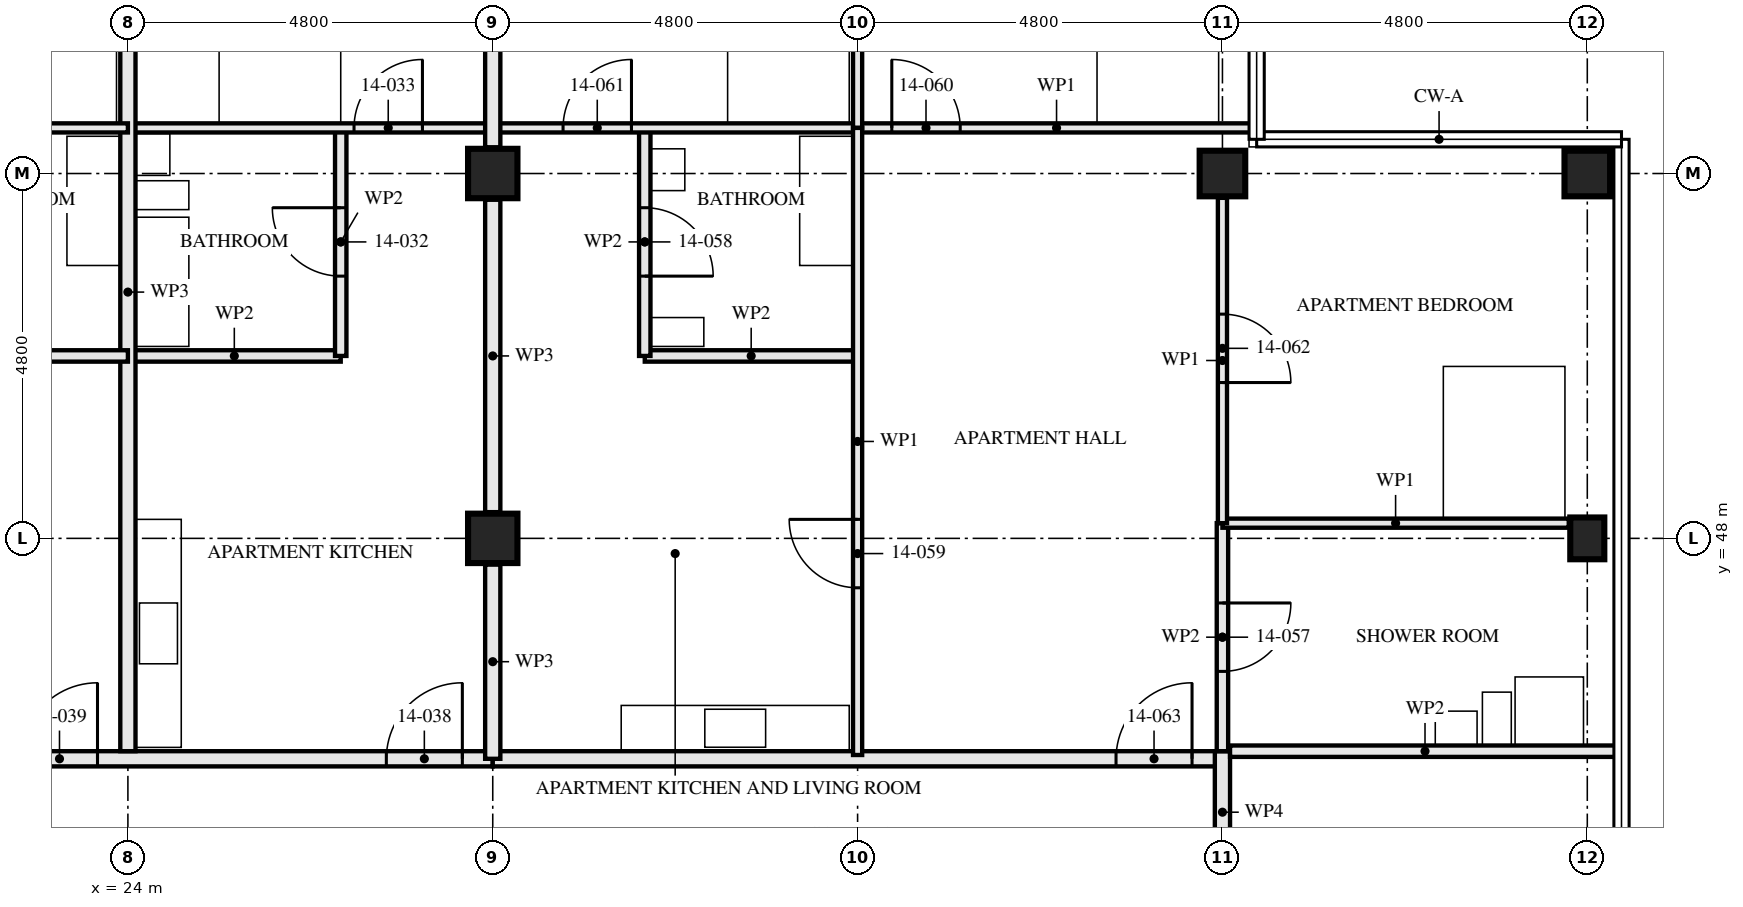
"""IFC4 building model, lengths in metres.
Left out: names, types, materials, properties, quantities, classifications, styles, units other than length and angle.
Written with IfcOpenShell. Run it as: python <this file> out.ifc"""

import sys

from ifc_helpers import new_model, si_unit, direction, frame, frame_2d, origin, origin_2d, place, context, subcontext, project, spatial, rectangle, hollow_rectangle, i_section, extrude, element, fill, save


model = new_model("IFC4")
c1 = context("Model", 3, precision=1e-05, world=origin(), true_north=direction((0.0, 1.0)))
c2 = subcontext(c1, "Body", "Model", "MODEL_VIEW")
j1 = project(units=[si_unit("LENGTHUNIT", "METRE"), si_unit("PLANEANGLEUNIT", "RADIAN")], contexts=[c1])
p1 = place(None, origin())
s1 = spatial("IfcSite", under=j1, at=p1, CompositionType="ELEMENT")
p2 = place(p1, origin())
s2 = spatial("IfcBuilding", under=s1, at=p2, CompositionType="ELEMENT")
p3 = place(p2, frame((0.0, 0.0, 55.0)))
s3 = spatial("IfcBuildingStorey", under=s2, at=p3, CompositionType="ELEMENT", Elevation=55.0)
for number, where, z_axis, x_axis in (
    (1, (28.8, 48.0, 0.0), (0.0, 0.0, 1.0), (1.0, 0.0, 0.0)),
    (2, (28.8, 52.8, 0.0), (0.0, 0.0, 1.0), (1.0, 0.0, 0.0)),
):
    element("IfcColumn", number, at=place(p3, frame(where, z_axis=z_axis, x_axis=x_axis)), inside=s3, PredefinedType="COLUMN", context=c2, shape_type="SweptSolid", body=[
        extrude(hollow_rectangle(XDim=0.65, YDim=0.65, WallThickness=0.05, at=origin_2d()), origin(), (0.0, 0.0, 1.0), 3.5),
    ])
p4 = place(p3, frame((38.4, 52.8, 0.0), z_axis=(0.0, 0.0, 1.0), x_axis=(0.0, 1.0, 0.0)))
e3 = element("IfcColumn", 3, at=p4, inside=s3, PredefinedType="COLUMN", context=c2, shape_type="SweptSolid", body=[
    extrude(hollow_rectangle(XDim=0.6, YDim=0.6, WallThickness=0.05, at=origin_2d()), origin(), (0.0, 0.0, 1.0), 3.5),
])
p5 = place(p3, frame((43.2, 48.0, 0.0), z_axis=(0.0, 0.0, 1.0), x_axis=(1.0, 0.0, 0.0)))
e4 = element("IfcColumn", 4, at=p5, inside=s3, PredefinedType="COLUMN", context=c2, shape_type="SweptSolid", body=[
    extrude(i_section(OverallWidth=0.448, OverallDepth=0.55, WebThickness=0.072, FlangeThickness=0.115, FilletRadius=0.015, at=origin_2d()), origin(), (0.0, 0.0, 1.0), 3.5),
])
p6 = place(p3, frame((43.2, 52.8, 0.0), z_axis=(0.0, 0.0, 1.0), x_axis=(0.0, 1.0, 0.0)))
e5 = element("IfcColumn", 5, at=p6, inside=s3, PredefinedType="COLUMN", context=c2, shape_type="SweptSolid", body=[
    extrude(hollow_rectangle(XDim=0.6, YDim=0.6, WallThickness=0.05, at=origin_2d()), origin(), (0.0, 0.0, 1.0), 3.5),
])
p7 = place(p3, frame((26.8, 53.4, 0.0), z_axis=(0.0, 0.0, 1.0), x_axis=(0.0, -1.0, 0.0)))
e6 = element("IfcWall", 6, at=p7, inside=s3, PredefinedType="PARTITIONING", context=c2, shape_type="SweptSolid", body=[
    extrude(rectangle(XDim=3.0, YDim=0.15, at=frame_2d((1.5, 0.0))), origin(), (0.0, 0.0, 1.0), 2.55),
])
p8 = place(p7, frame((1.05, 0.0, 0.0)))
e7 = element("IfcOpeningElement", 7, at=p8, cuts=e6, PredefinedType="OPENING", context=c2, shape_type="SweptSolid", body=[
    extrude(rectangle(XDim=0.9, YDim=2.1, at=frame_2d((0.45, 1.05))), frame((0.0, 0.085, 0.0), z_axis=(0.0, -1.0, 0.0), x_axis=(1.0, 0.0, 0.0)), (0.0, 0.0, 1.0), 0.171),
])
p9 = place(p3, frame((26.8, 50.4, 0.0), z_axis=(0.0, 0.0, 1.0), x_axis=(-1.0, 0.0, 0.0)))
e8 = element("IfcWall", 8, at=p9, inside=s3, PredefinedType="PARTITIONING", context=c2, shape_type="SweptSolid", body=[
    extrude(rectangle(XDim=2.8, YDim=0.15, at=frame_2d((1.4, 0.0))), origin(), (0.0, 0.0, 1.0), 3.33),
])
p10 = place(p3, frame((28.8, 53.4, 0.0), z_axis=(0.0, 0.0, 1.0), x_axis=(-1.0, 0.0, 0.0)))
e9 = element("IfcWall", 9, at=p10, inside=s3, PredefinedType="PARTITIONING", context=c2, shape_type="SweptSolid", body=[
    extrude(rectangle(XDim=4.8, YDim=0.12, at=frame_2d((2.4, 0.0))), origin(), (0.0, 0.0, 1.0), 3.33),
])
p11 = place(p10, frame((0.925, 0.0, 0.0)))
e10 = element("IfcOpeningElement", 10, at=p11, cuts=e9, PredefinedType="OPENING", context=c2, shape_type="SweptSolid", body=[
    extrude(rectangle(XDim=0.9, YDim=2.1, at=frame_2d((0.45, 1.05))), frame((0.0, 0.071, 0.0), z_axis=(0.0, -1.0, 0.0), x_axis=(1.0, 0.0, 0.0)), (0.0, 0.0, 1.0), 0.141),
])
p12 = place(p3, frame((24.0, 57.28, 0.0), z_axis=(0.0, 0.0, 1.0), x_axis=(0.0, -1.0, 0.0)))
e11 = element("IfcWall", 11, at=p12, inside=s3, PredefinedType="PARTITIONING", context=c2, shape_type="SweptSolid", body=[
    extrude(rectangle(XDim=12.08, YDim=0.2, at=frame_2d((6.04, 0.0))), origin(), (0.0, 0.0, 1.0), 2.55),
])
p13 = place(p3, frame((24.0, 50.4, 0.0), z_axis=(0.0, 0.0, 1.0), x_axis=(-1.0, 0.0, 0.0)))
e12 = element("IfcWall", 12, at=p13, inside=s3, PredefinedType="PARTITIONING", context=c2, shape_type="SweptSolid", body=[
    extrude(rectangle(XDim=2.8, YDim=0.15, at=frame_2d((1.4, 0.0))), origin(), (0.0, 0.0, 1.0), 3.33),
])
p14 = place(p3, frame((24.0, 53.4, 0.0), z_axis=(0.0, 0.0, 1.0), x_axis=(-1.0, 0.0, 0.0)))
e13 = element("IfcWall", 13, at=p14, inside=s3, PredefinedType="PARTITIONING", context=c2, shape_type="SweptSolid", body=[
    extrude(rectangle(XDim=4.8, YDim=0.12, at=frame_2d((2.4, 0.0))), origin(), (0.0, 0.0, 1.0), 3.33),
])
p15 = place(p14, frame((3.45, 0.0, 0.0)))
e14 = element("IfcOpeningElement", 14, at=p15, cuts=e13, PredefinedType="OPENING", context=c2, shape_type="SweptSolid", body=[
    extrude(rectangle(XDim=0.9, YDim=2.1, at=frame_2d((0.45, 1.05))), frame((0.0, 0.071, 0.0), z_axis=(0.0, -1.0, 0.0), x_axis=(1.0, 0.0, 0.0)), (0.0, 0.0, 1.0), 0.141),
])
p16 = place(p3, frame((28.8, 45.1, 0.0), z_axis=(0.0, 0.0, 1.0), x_axis=(-1.0, 0.0, 0.0)))
e15 = element("IfcWall", 15, at=p16, inside=s3, PredefinedType="PARTITIONING", context=c2, shape_type="SweptSolid", body=[
    extrude(rectangle(XDim=14.4, YDim=0.2, at=frame_2d((7.2, 0.0))), origin(), (0.0, 0.0, 1.0), 3.33),
])
p17 = place(p16, frame((0.4, 0.0, 0.0)))
e16 = element("IfcOpeningElement", 16, at=p17, cuts=e15, PredefinedType="OPENING", context=c2, shape_type="SweptSolid", body=[
    extrude(rectangle(XDim=1.0, YDim=2.1, at=frame_2d((0.5, 1.05))), frame((0.0, 0.111, 0.0), z_axis=(0.0, -1.0, 0.0), x_axis=(1.0, 0.0, 0.0)), (0.0, 0.0, 1.0), 0.221),
])
p18 = place(p16, frame((5.2, 0.0, 0.0)))
e17 = element("IfcOpeningElement", 17, at=p18, cuts=e15, PredefinedType="OPENING", context=c2, shape_type="SweptSolid", body=[
    extrude(rectangle(XDim=1.0, YDim=2.1, at=frame_2d((0.5, 1.05))), frame((0.0, 0.111, 0.0), z_axis=(0.0, -1.0, 0.0), x_axis=(1.0, 0.0, 0.0)), (0.0, 0.0, 1.0), 0.221),
])
p19 = place(p16, frame((10.0, 0.0, 0.0)))
e18 = element("IfcOpeningElement", 18, at=p19, cuts=e15, PredefinedType="OPENING", context=c2, shape_type="SweptSolid", body=[
    extrude(rectangle(XDim=1.0, YDim=2.1, at=frame_2d((0.5, 1.05))), frame((0.0, 0.111, 0.0), z_axis=(0.0, -1.0, 0.0), x_axis=(1.0, 0.0, 0.0)), (0.0, 0.0, 1.0), 0.221),
])
p20 = place(p3, frame((38.4, 48.2, 0.0), z_axis=(0.0, 0.0, 1.0), x_axis=(0.0, -1.0, 0.0)))
e19 = element("IfcWall", 19, at=p20, inside=s3, PredefinedType="PARTITIONING", context=c2, shape_type="SweptSolid", body=[
    extrude(rectangle(XDim=3.0, YDim=0.15, at=frame_2d((1.5, 0.0))), origin(), (0.0, 0.0, 1.0), 2.55),
])
p21 = place(p20, frame((1.05, 0.0, 0.0)))
e20 = element("IfcOpeningElement", 20, at=p21, cuts=e19, PredefinedType="OPENING", context=c2, shape_type="SweptSolid", body=[
    extrude(rectangle(XDim=0.9, YDim=2.1, at=frame_2d((0.45, 1.05))), frame((0.0, 0.085, 0.0), z_axis=(0.0, -1.0, 0.0), x_axis=(1.0, 0.0, 0.0)), (0.0, 0.0, 1.0), 0.171),
])
p22 = place(p3, frame((30.8, 53.4, 0.0), z_axis=(0.0, 0.0, 1.0), x_axis=(0.0, -1.0, 0.0)))
e21 = element("IfcWall", 21, at=p22, inside=s3, PredefinedType="PARTITIONING", context=c2, shape_type="SweptSolid", body=[
    extrude(rectangle(XDim=3.0, YDim=0.15, at=frame_2d((1.5, 0.0))), origin(), (0.0, 0.0, 1.0), 2.55),
])
p23 = place(p22, frame((1.05, 0.0, 0.0)))
e22 = element("IfcOpeningElement", 22, at=p23, cuts=e21, PredefinedType="OPENING", context=c2, shape_type="SweptSolid", body=[
    extrude(rectangle(XDim=0.9, YDim=2.1, at=frame_2d((0.45, 1.05))), frame((0.0, 0.085, 0.0), z_axis=(0.0, -1.0, 0.0), x_axis=(1.0, 0.0, 0.0)), (0.0, 0.0, 1.0), 0.171),
])
p24 = place(p3, frame((33.6, 50.4, 0.0), z_axis=(0.0, 0.0, 1.0), x_axis=(-1.0, 0.0, 0.0)))
e23 = element("IfcWall", 23, at=p24, inside=s3, PredefinedType="PARTITIONING", context=c2, shape_type="SweptSolid", body=[
    extrude(rectangle(XDim=2.8, YDim=0.15, at=frame_2d((1.4, 0.0))), origin(), (0.0, 0.0, 1.0), 3.33),
])
p25 = place(p3, frame((33.6, 53.4, 0.0), z_axis=(0.0, 0.0, 1.0), x_axis=(0.0, -1.0, 0.0)))
e24 = element("IfcWall", 24, at=p25, inside=s3, PredefinedType="PARTITIONING", context=c2, shape_type="SweptSolid", body=[
    extrude(rectangle(XDim=8.25, YDim=0.12, at=frame_2d((4.125, 0.0))), origin(), (0.0, 0.0, 1.0), 2.55),
])
p26 = place(p25, frame((5.15, 0.0, 0.0)))
e25 = element("IfcOpeningElement", 25, at=p26, cuts=e24, PredefinedType="OPENING", context=c2, shape_type="SweptSolid", body=[
    extrude(rectangle(XDim=0.9, YDim=2.1, at=frame_2d((0.45, 1.05))), frame((0.0, 0.071, 0.0), z_axis=(0.0, -1.0, 0.0), x_axis=(1.0, 0.0, 0.0)), (0.0, 0.0, 1.0), 0.141),
])
p27 = place(p3, frame((42.956, 48.2, 0.0), z_axis=(0.0, 0.0, 1.0), x_axis=(-1.0, 0.0, 0.0)))
e26 = element("IfcWall", 26, at=p27, inside=s3, PredefinedType="PARTITIONING", context=c2, shape_type="SweptSolid", body=[
    extrude(rectangle(XDim=4.556, YDim=0.12, at=frame_2d((2.278, 0.0))), origin(), (0.0, 0.0, 1.0), 3.33),
])
p28 = place(p3, frame((38.835, 53.4, 0.0), z_axis=(0.0, 0.0, 1.0), x_axis=(-1.0, 0.0, 0.0)))
e27 = element("IfcWall", 27, at=p28, inside=s3, PredefinedType="PARTITIONING", context=c2, shape_type="SweptSolid", body=[
    extrude(rectangle(XDim=5.235, YDim=0.12, at=frame_2d((2.617, 0.0))), origin(), (0.0, 0.0, 1.0), 2.32),
])
p29 = place(p28, frame((3.885, 0.0, 0.0)))
e28 = element("IfcOpeningElement", 28, at=p29, cuts=e27, PredefinedType="OPENING", context=c2, shape_type="SweptSolid", body=[
    extrude(rectangle(XDim=0.9, YDim=2.1, at=frame_2d((0.45, 1.05))), frame((0.0, 0.071, 0.0), z_axis=(0.0, -1.0, 0.0), x_axis=(1.0, 0.0, 0.0)), (0.0, 0.0, 1.0), 0.141),
])
p30 = place(p3, frame((33.6, 53.4, 0.0), z_axis=(0.0, 0.0, 1.0), x_axis=(-1.0, 0.0, 0.0)))
e29 = element("IfcWall", 29, at=p30, inside=s3, PredefinedType="PARTITIONING", context=c2, shape_type="SweptSolid", body=[
    extrude(rectangle(XDim=4.8, YDim=0.12, at=frame_2d((2.4, 0.0))), origin(), (0.0, 0.0, 1.0), 3.33),
])
p31 = place(p30, frame((2.975, 0.0, 0.0)))
e30 = element("IfcOpeningElement", 30, at=p31, cuts=e29, PredefinedType="OPENING", context=c2, shape_type="SweptSolid", body=[
    extrude(rectangle(XDim=0.9, YDim=2.1, at=frame_2d((0.45, 1.05))), frame((0.0, 0.071, 0.0), z_axis=(0.0, -1.0, 0.0), x_axis=(1.0, 0.0, 0.0)), (0.0, 0.0, 1.0), 0.141),
])
p32 = place(p3, frame((38.4, 52.48, 0.0), z_axis=(0.0, 0.0, 1.0), x_axis=(0.0, -1.0, 0.0)))
e31 = element("IfcWall", 31, at=p32, inside=s3, PredefinedType="PARTITIONING", context=c2, shape_type="SweptSolid", body=[
    extrude(rectangle(XDim=4.28, YDim=0.12, at=frame_2d((2.14, 0.0))), origin(), (0.0, 0.0, 1.0), 3.33),
])
p33 = place(p32, frame((1.53, 0.0, 0.0)))
e32 = element("IfcOpeningElement", 32, at=p33, cuts=e31, PredefinedType="OPENING", context=c2, shape_type="SweptSolid", body=[
    extrude(rectangle(XDim=0.9, YDim=2.1, at=frame_2d((0.45, 1.05))), frame((0.0, 0.071, 0.0), z_axis=(0.0, -1.0, 0.0), x_axis=(1.0, 0.0, 0.0)), (0.0, 0.0, 1.0), 0.141),
])
p34 = place(p3, frame((33.6, 57.356, 0.0), z_axis=(0.0, 0.0, 1.0), x_axis=(0.0, -1.0, 0.0)))
e33 = element("IfcWall", 33, at=p34, inside=s3, PredefinedType="PARTITIONING", context=c2, shape_type="SweptSolid", body=[
    extrude(rectangle(XDim=3.956, YDim=0.12, at=frame_2d((1.978, 0.0))), origin(), (0.0, 0.0, 1.0), 3.33),
])
p35 = place(p3, frame((38.4, 45.1, 0.0), z_axis=(0.0, 0.0, 1.0), x_axis=(-1.0, 0.0, 0.0)))
e34 = element("IfcWall", 34, at=p35, inside=s3, PredefinedType="PARTITIONING", context=c2, shape_type="SweptSolid", body=[
    extrude(rectangle(XDim=9.6, YDim=0.2, at=frame_2d((4.8, 0.0))), origin(), (0.0, 0.0, 1.0), 3.33),
])
p36 = place(p35, frame((0.4, 0.0, 0.0)))
e35 = element("IfcOpeningElement", 35, at=p36, cuts=e34, PredefinedType="OPENING", context=c2, shape_type="SweptSolid", body=[
    extrude(rectangle(XDim=1.0, YDim=2.1, at=frame_2d((0.5, 1.05))), frame((0.0, 0.111, 0.0), z_axis=(0.0, -1.0, 0.0), x_axis=(1.0, 0.0, 0.0)), (0.0, 0.0, 1.0), 0.221),
])
p37 = place(p3, frame((38.4, 45.2, 0.0), z_axis=(0.0, 0.0, 1.0), x_axis=(0.0, -1.0, 0.0)))
e36 = element("IfcWall", 36, at=p37, inside=s3, PredefinedType="PARTITIONING", context=c2, shape_type="SweptSolid", body=[
    extrude(rectangle(XDim=1.605, YDim=0.2, at=frame_2d((0.802, 0.0))), origin(), (0.0, 0.0, 1.0), 3.33),
])
p38 = place(p3, frame((28.8, 45.1, 0.0), z_axis=(0.0, 0.0, 1.0), x_axis=(0.0, 1.0, 0.0)))
e37 = element("IfcWall", 37, at=p38, inside=s3, PredefinedType="PARTITIONING", context=c2, shape_type="SweptSolid", body=[
    extrude(rectangle(XDim=2.555, YDim=0.2, at=frame_2d((1.277, 0.0))), origin(), (0.0, 0.0, 1.0), 2.32),
])
p39 = place(p3, frame((28.8, 48.345, 0.0), z_axis=(0.0, 0.0, 1.0), x_axis=(0.0, 1.0, 0.0)))
e38 = element("IfcWall", 38, at=p39, inside=s3, PredefinedType="PARTITIONING", context=c2, shape_type="SweptSolid", body=[
    extrude(rectangle(XDim=4.11, YDim=0.2, at=frame_2d((2.055, 0.0))), origin(), (0.0, 0.0, 1.0), 2.32),
])
p40 = place(p3, frame((28.8, 53.145, 0.0), z_axis=(0.0, 0.0, 1.0), x_axis=(0.0, 1.0, 0.0)))
e39 = element("IfcWall", 39, at=p40, inside=s3, PredefinedType="PARTITIONING", context=c2, shape_type="SweptSolid", body=[
    extrude(rectangle(XDim=4.211, YDim=0.2, at=frame_2d((2.105, 0.0))), origin(), (0.0, 0.0, 1.0), 2.32),
])
p41 = place(p3, frame((43.63, 45.2, 0.0), z_axis=(0.0, 0.0, 1.0), x_axis=(-1.0, 0.0, 0.0)))
e40 = element("IfcWall", 40, at=p41, inside=s3, PredefinedType="PARTITIONING", context=c2, shape_type="SweptSolid", body=[
    extrude(rectangle(XDim=5.13, YDim=0.15, at=frame_2d((2.565, 0.0))), origin(), (0.0, 0.0, 1.0), 2.32),
])
p42 = place(p8, frame((0.9, 0.0, 0.0), z_axis=(0.0, 0.0, 1.0), x_axis=(-1.0, 0.0, 0.0)))
e41 = element("IfcDoor", 41, at=p42, inside=s3, OperationType="SINGLE_SWING_LEFT", PredefinedType="DOOR", context=c2, shape_type="SweptSolid", body=[
    extrude(rectangle(XDim=0.9, YDim=2.1, at=frame_2d((0.45, 1.05))), frame((0.0, 0.022, 0.0), z_axis=(0.0, -1.0, 0.0), x_axis=(1.0, 0.0, 0.0)), (0.0, 0.0, 1.0), 0.044),
])
fill(e7, e41)
p43 = place(p11, frame((0.9, 0.0, 0.0), z_axis=(0.0, 0.0, 1.0), x_axis=(-1.0, 0.0, 0.0)))
e42 = element("IfcDoor", 42, at=p43, inside=s3, OperationType="SINGLE_SWING_LEFT", PredefinedType="DOOR", context=c2, shape_type="SweptSolid", body=[
    extrude(rectangle(XDim=0.9, YDim=2.1, at=frame_2d((0.45, 1.05))), frame((0.0, 0.022, 0.0), z_axis=(0.0, -1.0, 0.0), x_axis=(1.0, 0.0, 0.0)), (0.0, 0.0, 1.0), 0.044),
])
fill(e10, e42)
p44 = place(p17, frame((1.0, 0.0, 0.0), z_axis=(0.0, 0.0, 1.0), x_axis=(-1.0, 0.0, 0.0)))
e43 = element("IfcDoor", 43, at=p44, inside=s3, OperationType="SINGLE_SWING_LEFT", PredefinedType="DOOR", context=c2, shape_type="SweptSolid", body=[
    extrude(rectangle(XDim=1.0, YDim=2.1, at=frame_2d((0.5, 1.05))), frame((0.0, 0.027, 0.0), z_axis=(0.0, -1.0, 0.0), x_axis=(1.0, 0.0, 0.0)), (0.0, 0.0, 1.0), 0.054),
])
fill(e16, e43)
p45 = place(p18, frame((1.0, 0.0, 0.0), z_axis=(0.0, 0.0, 1.0), x_axis=(-1.0, 0.0, 0.0)))
e44 = element("IfcDoor", 44, at=p45, inside=s3, OperationType="SINGLE_SWING_LEFT", PredefinedType="DOOR", context=c2, shape_type="SweptSolid", body=[
    extrude(rectangle(XDim=1.0, YDim=2.1, at=frame_2d((0.5, 1.05))), frame((0.0, 0.027, 0.0), z_axis=(0.0, -1.0, 0.0), x_axis=(1.0, 0.0, 0.0)), (0.0, 0.0, 1.0), 0.054),
])
fill(e17, e44)
p46 = place(p21, origin())
e45 = element("IfcDoor", 45, at=p46, inside=s3, OperationType="SINGLE_SWING_RIGHT", PredefinedType="DOOR", context=c2, shape_type="SweptSolid", body=[
    extrude(rectangle(XDim=0.9, YDim=2.1, at=frame_2d((0.45, 1.05))), frame((0.0, 0.022, 0.0), z_axis=(0.0, -1.0, 0.0), x_axis=(1.0, 0.0, 0.0)), (0.0, 0.0, 1.0), 0.044),
])
fill(e20, e45)
p47 = place(p23, origin())
e46 = element("IfcDoor", 46, at=p47, inside=s3, OperationType="SINGLE_SWING_LEFT", PredefinedType="DOOR", context=c2, shape_type="SweptSolid", body=[
    extrude(rectangle(XDim=0.9, YDim=2.1, at=frame_2d((0.45, 1.05))), frame((0.0, 0.022, 0.0), z_axis=(0.0, -1.0, 0.0), x_axis=(1.0, 0.0, 0.0)), (0.0, 0.0, 1.0), 0.044),
])
fill(e22, e46)
p48 = place(p26, frame((0.9, 0.0, 0.0), z_axis=(0.0, 0.0, 1.0), x_axis=(-1.0, 0.0, 0.0)))
e47 = element("IfcDoor", 47, at=p48, inside=s3, OperationType="SINGLE_SWING_LEFT", PredefinedType="DOOR", context=c2, shape_type="SweptSolid", body=[
    extrude(rectangle(XDim=0.9, YDim=2.1, at=frame_2d((0.45, 1.05))), frame((0.0, 0.022, 0.0), z_axis=(0.0, -1.0, 0.0), x_axis=(1.0, 0.0, 0.0)), (0.0, 0.0, 1.0), 0.044),
])
fill(e25, e47)
p49 = place(p29, frame((0.9, 0.0, 0.0), z_axis=(0.0, 0.0, 1.0), x_axis=(-1.0, 0.0, 0.0)))
e48 = element("IfcDoor", 48, at=p49, inside=s3, OperationType="SINGLE_SWING_RIGHT", PredefinedType="DOOR", context=c2, shape_type="SweptSolid", body=[
    extrude(rectangle(XDim=0.9, YDim=2.1, at=frame_2d((0.45, 1.05))), frame((0.0, 0.022, 0.0), z_axis=(0.0, -1.0, 0.0), x_axis=(1.0, 0.0, 0.0)), (0.0, 0.0, 1.0), 0.044),
])
fill(e28, e48)
p50 = place(p31, frame((0.9, 0.0, 0.0), z_axis=(0.0, 0.0, 1.0), x_axis=(-1.0, 0.0, 0.0)))
e49 = element("IfcDoor", 49, at=p50, inside=s3, OperationType="SINGLE_SWING_LEFT", PredefinedType="DOOR", context=c2, shape_type="SweptSolid", body=[
    extrude(rectangle(XDim=0.9, YDim=2.1, at=frame_2d((0.45, 1.05))), frame((0.0, 0.022, 0.0), z_axis=(0.0, -1.0, 0.0), x_axis=(1.0, 0.0, 0.0)), (0.0, 0.0, 1.0), 0.044),
])
fill(e30, e49)
p51 = place(p33, origin())
e50 = element("IfcDoor", 50, at=p51, inside=s3, OperationType="SINGLE_SWING_LEFT", PredefinedType="DOOR", context=c2, shape_type="SweptSolid", body=[
    extrude(rectangle(XDim=0.9, YDim=2.1, at=frame_2d((0.45, 1.05))), frame((0.0, 0.022, 0.0), z_axis=(0.0, -1.0, 0.0), x_axis=(1.0, 0.0, 0.0)), (0.0, 0.0, 1.0), 0.044),
])
fill(e32, e50)
p52 = place(p36, frame((1.0, 0.0, 0.0), z_axis=(0.0, 0.0, 1.0), x_axis=(-1.0, 0.0, 0.0)))
e51 = element("IfcDoor", 51, at=p52, inside=s3, OperationType="SINGLE_SWING_LEFT", PredefinedType="DOOR", context=c2, shape_type="SweptSolid", body=[
    extrude(rectangle(XDim=1.0, YDim=2.1, at=frame_2d((0.5, 1.05))), frame((0.0, 0.027, 0.0), z_axis=(0.0, -1.0, 0.0), x_axis=(1.0, 0.0, 0.0)), (0.0, 0.0, 1.0), 0.054),
])
fill(e35, e51)
save(model, sys.argv[1])
